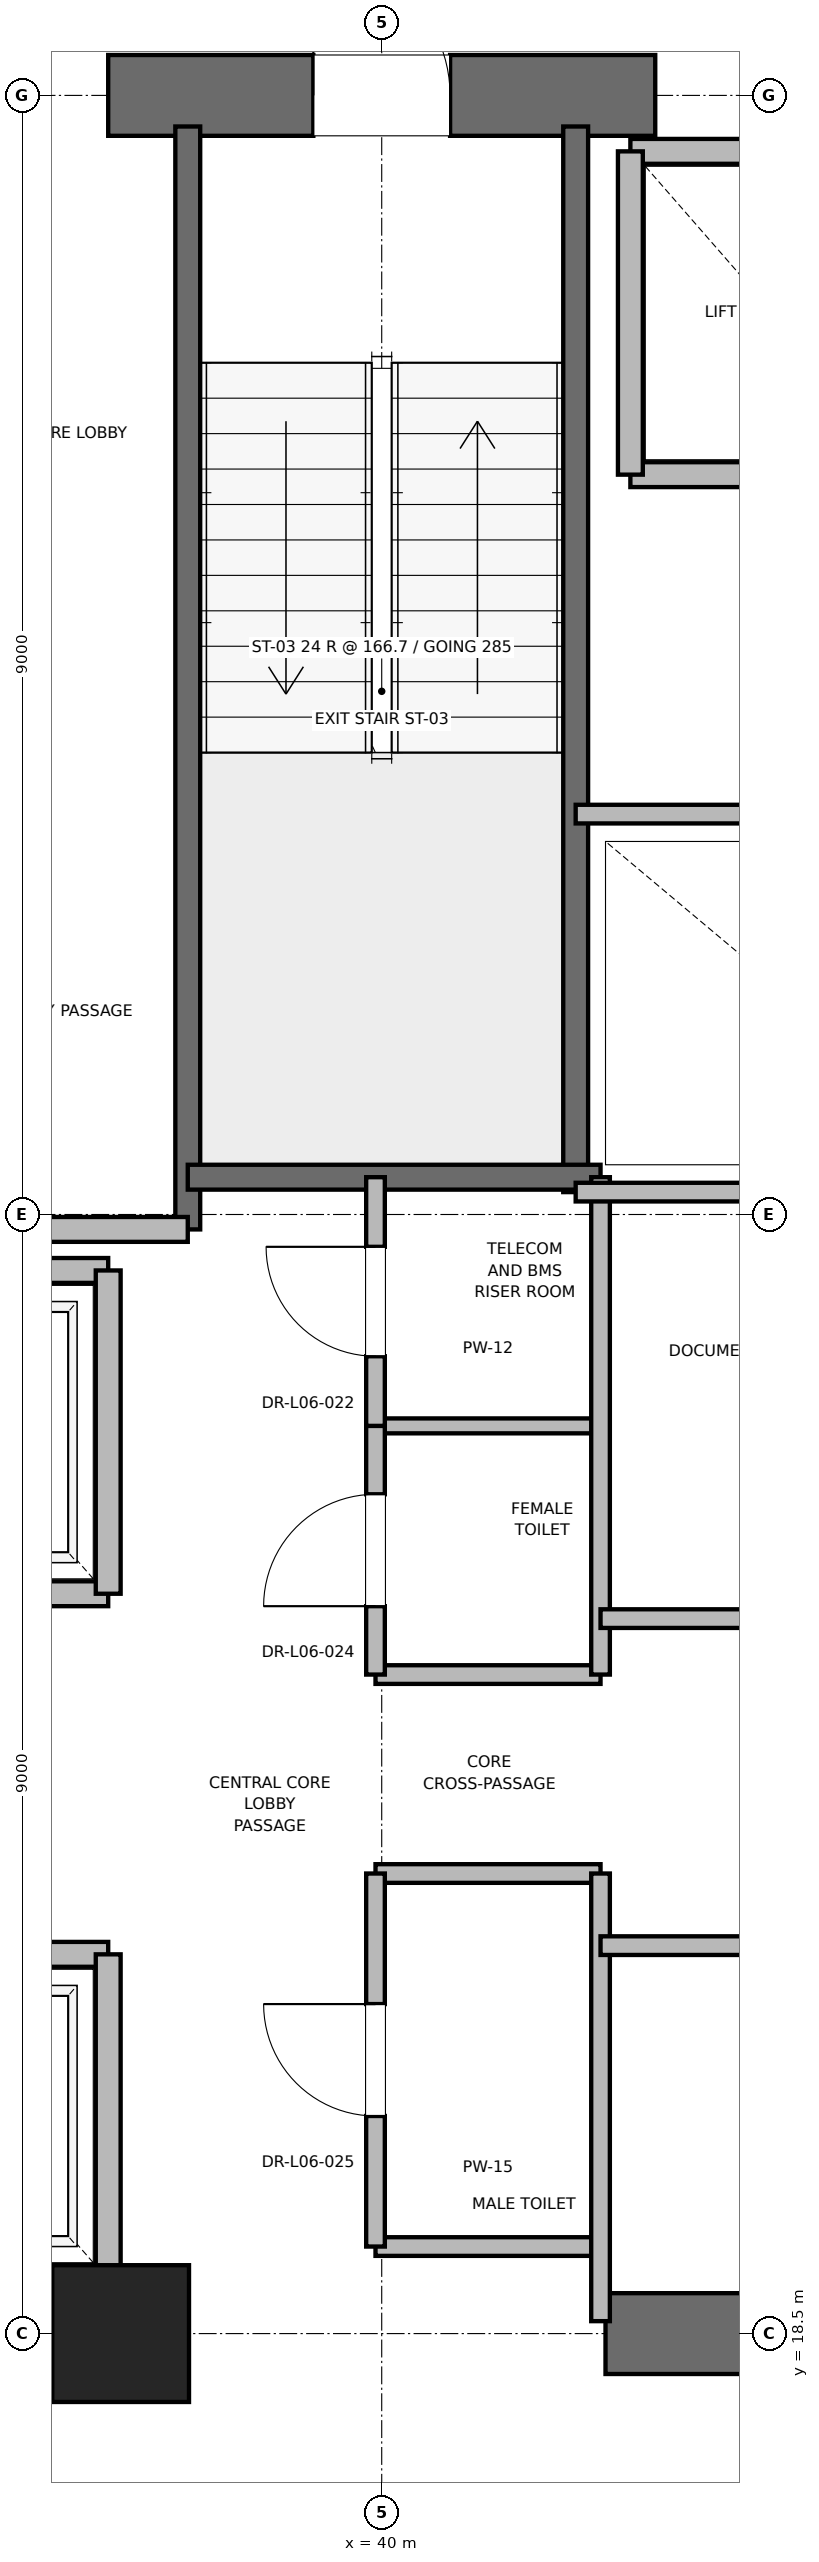
"""IFC4 building model, lengths in metres.
Left out: names, types, materials, properties, quantities, classifications, styles, units other than length and angle.
Written with IfcOpenShell. Run it as: python <this file> out.ifc"""

import sys

from ifc_helpers import new_model, si_unit, direction, frame, frame_2d, origin, origin_2d, place, context, subcontext, project, spatial, rectangle, extrude, element, fill, save


model = new_model("IFC4")
c1 = context("Model", 3, precision=1e-05, world=origin(), true_north=direction((0.0, 1.0)))
c2 = subcontext(c1, "Body", "Model", "MODEL_VIEW")
j1 = project(units=[si_unit("LENGTHUNIT", "METRE"), si_unit("PLANEANGLEUNIT", "RADIAN")], contexts=[c1])
p1 = place(None, origin())
s1 = spatial("IfcSite", under=j1, at=p1, CompositionType="ELEMENT")
p2 = place(p1, origin())
s2 = spatial("IfcBuilding", under=s1, at=p2, CompositionType="ELEMENT")
p3 = place(p2, frame((0.0, 0.0, 31.6)))
s3 = spatial("IfcBuildingStorey", under=s2, at=p3, CompositionType="ELEMENT", Elevation=31.6)
p4 = place(p3, frame((37.9, 18.5, 0.0), z_axis=(0.0, 0.0, 1.0), x_axis=(1.0, 0.0, 0.0)))
e1 = element("IfcColumn", 1, at=p4, inside=s3, PredefinedType="PILASTER", context=c2, shape_type="SweptSolid", body=[
    extrude(rectangle(XDim=1.1, YDim=1.1, at=origin_2d()), origin(), (0.0, 0.0, 1.0), 4.0),
])
for number, where, z_axis, x_axis in (
    (2, (29.0, 18.5, 0.0), (0.0, 0.0, 1.0), (1.0, 0.0, 0.0)),
    (3, (41.8, 18.5, 0.0), (0.0, 0.0, 1.0), (1.0, 0.0, 0.0)),
):
    element("IfcWall", number, at=place(p3, frame(where, z_axis=z_axis, x_axis=x_axis)), inside=s3, PredefinedType="SHEAR", context=c2, shape_type="SweptSolid", body=[
        extrude(rectangle(XDim=9.2, YDim=0.65, at=frame_2d((4.6, 0.0))), origin(), (0.0, 0.0, 1.0), 3.76),
    ])
p5 = place(p3, frame((37.8, 36.5, 0.0), z_axis=(0.0, 0.0, 1.0), x_axis=(1.0, 0.0, 0.0)))
e4 = element("IfcWall", 4, at=p5, inside=s3, PredefinedType="SHEAR", context=c2, shape_type="SweptSolid", body=[
    extrude(rectangle(XDim=4.4, YDim=0.65, at=frame_2d((2.2, 0.0))), origin(), (0.0, 0.0, 1.0), 3.76),
])
p6 = place(p5, frame((1.65, 0.0, 0.0)))
e5 = element("IfcOpeningElement", 5, at=p6, cuts=e4, PredefinedType="OPENING", context=c2, shape_type="SweptSolid", body=[
    extrude(rectangle(XDim=1.1, YDim=2.15, at=frame_2d((0.55, 1.075))), frame((0.0, 0.325, 0.0), z_axis=(0.0, -1.0, 0.0), x_axis=(1.0, 0.0, 0.0)), (0.0, 0.0, 1.0), 0.65),
])
p7 = place(p3, frame((38.44, 27.38, 0.0), z_axis=(0.0, 0.0, 1.0), x_axis=(0.0, 1.0, 0.0)))
e6 = element("IfcWall", 6, at=p7, inside=s3, PredefinedType="SOLIDWALL", context=c2, shape_type="SweptSolid", body=[
    extrude(rectangle(XDim=8.87, YDim=0.2, at=frame_2d((4.435, 0.0))), origin(), (0.0, 0.0, 1.0), 3.76),
])
p8 = place(p3, frame((41.56, 27.68, 0.0), z_axis=(0.0, 0.0, 1.0), x_axis=(0.0, 1.0, 0.0)))
e7 = element("IfcWall", 7, at=p8, inside=s3, PredefinedType="SOLIDWALL", context=c2, shape_type="SweptSolid", body=[
    extrude(rectangle(XDim=8.57, YDim=0.2, at=frame_2d((4.285, 0.0))), origin(), (0.0, 0.0, 1.0), 3.76),
])
p9 = place(p3, frame((38.44, 27.8, 0.0), z_axis=(0.0, 0.0, 1.0), x_axis=(1.0, 0.0, 0.0)))
e8 = element("IfcWall", 8, at=p9, inside=s3, PredefinedType="SOLIDWALL", context=c2, shape_type="SweptSolid", body=[
    extrude(rectangle(XDim=3.32, YDim=0.2, at=frame_2d((1.66, 0.0))), origin(), (0.0, 0.0, 1.0), 3.76),
])
p10 = place(p3, frame((32.82, 27.38, 0.0), z_axis=(0.0, 0.0, 1.0), x_axis=(1.0, 0.0, 0.0)))
e9 = element("IfcWall", 9, at=p10, inside=s3, PredefinedType="PARTITIONING", context=c2, shape_type="SweptSolid", body=[
    extrude(rectangle(XDim=5.62, YDim=0.2, at=frame_2d((2.81, 0.0))), origin(), (0.0, 0.0, 1.0), 3.76),
])
p11 = place(p3, frame((35.5, 18.95, 0.0), z_axis=(0.0, 0.0, 1.0), x_axis=(1.0, 0.0, 0.0)))
e10 = element("IfcWall", 10, at=p11, inside=s3, PredefinedType="SOLIDWALL", context=c2, shape_type="SweptSolid", body=[
    extrude(rectangle(XDim=2.3, YDim=0.2, at=frame_2d((1.15, 0.0))), origin(), (0.0, 0.0, 1.0), 2.54),
])
p12 = place(p3, frame((37.8, 21.55, 0.0), z_axis=(0.0, 0.0, 1.0), x_axis=(-1.0, 0.0, 0.0)))
e11 = element("IfcWall", 11, at=p12, inside=s3, PredefinedType="SOLIDWALL", context=c2, shape_type="SweptSolid", body=[
    extrude(rectangle(XDim=2.3, YDim=0.2, at=frame_2d((1.15, 0.0))), origin(), (0.0, 0.0, 1.0), 3.76),
])
p13 = place(p12, frame((0.6, 0.0, 0.0)))
e12 = element("IfcOpeningElement", 12, at=p13, cuts=e11, PredefinedType="OPENING", context=c2, shape_type="SweptSolid", body=[
    extrude(rectangle(XDim=1.1, YDim=2.2, at=frame_2d((0.55, 1.1))), frame((0.0, 0.1, 0.0), z_axis=(0.0, -1.0, 0.0), x_axis=(1.0, 0.0, 0.0)), (0.0, 0.0, 1.0), 0.2),
])
p14 = place(p3, frame((37.8, 18.95, 0.0), z_axis=(0.0, 0.0, 1.0), x_axis=(0.0, 1.0, 0.0)))
e13 = element("IfcWall", 13, at=p14, inside=s3, PredefinedType="SOLIDWALL", context=c2, shape_type="SweptSolid", body=[
    extrude(rectangle(XDim=2.6, YDim=0.2, at=frame_2d((1.3, 0.0))), origin(), (0.0, 0.0, 1.0), 2.54),
])
p15 = place(p3, frame((35.5, 24.45, 0.0), z_axis=(0.0, 0.0, 1.0), x_axis=(1.0, 0.0, 0.0)))
e14 = element("IfcWall", 14, at=p15, inside=s3, PredefinedType="SOLIDWALL", context=c2, shape_type="SweptSolid", body=[
    extrude(rectangle(XDim=2.3, YDim=0.2, at=frame_2d((1.15, 0.0))), origin(), (0.0, 0.0, 1.0), 3.76),
])
p16 = place(p15, frame((0.6, 0.0, 0.0)))
e15 = element("IfcOpeningElement", 15, at=p16, cuts=e14, PredefinedType="OPENING", context=c2, shape_type="SweptSolid", body=[
    extrude(rectangle(XDim=1.1, YDim=2.2, at=frame_2d((0.55, 1.1))), frame((0.0, 0.1, 0.0), z_axis=(0.0, -1.0, 0.0), x_axis=(1.0, 0.0, 0.0)), (0.0, 0.0, 1.0), 0.2),
])
p17 = place(p3, frame((37.8, 27.05, 0.0), z_axis=(0.0, 0.0, 1.0), x_axis=(-1.0, 0.0, 0.0)))
e16 = element("IfcWall", 16, at=p17, inside=s3, PredefinedType="SOLIDWALL", context=c2, shape_type="SweptSolid", body=[
    extrude(rectangle(XDim=2.3, YDim=0.2, at=frame_2d((1.15, 0.0))), origin(), (0.0, 0.0, 1.0), 3.76),
])
p18 = place(p3, frame((37.8, 24.45, 0.0), z_axis=(0.0, 0.0, 1.0), x_axis=(0.0, 1.0, 0.0)))
e17 = element("IfcWall", 17, at=p18, inside=s3, PredefinedType="SOLIDWALL", context=c2, shape_type="SweptSolid", body=[
    extrude(rectangle(XDim=2.6, YDim=0.2, at=frame_2d((1.3, 0.0))), origin(), (0.0, 0.0, 1.0), 3.76),
])
p19 = place(p3, frame((42.0, 33.45, 0.0), z_axis=(0.0, 0.0, 1.0), x_axis=(1.0, 0.0, 0.0)))
e18 = element("IfcWall", 18, at=p19, inside=s3, PredefinedType="SOLIDWALL", context=c2, shape_type="SweptSolid", body=[
    extrude(rectangle(XDim=2.3, YDim=0.2, at=frame_2d((1.15, 0.0))), origin(), (0.0, 0.0, 1.0), 3.76),
])
p20 = place(p3, frame((44.3, 36.05, 0.0), z_axis=(0.0, 0.0, 1.0), x_axis=(-1.0, 0.0, 0.0)))
e19 = element("IfcWall", 19, at=p20, inside=s3, PredefinedType="SOLIDWALL", context=c2, shape_type="SweptSolid", body=[
    extrude(rectangle(XDim=2.3, YDim=0.2, at=frame_2d((1.15, 0.0))), origin(), (0.0, 0.0, 1.0), 2.54),
])
p21 = place(p3, frame((42.0, 36.05, 0.0), z_axis=(0.0, 0.0, 1.0), x_axis=(0.0, -1.0, 0.0)))
e20 = element("IfcWall", 20, at=p21, inside=s3, PredefinedType="SOLIDWALL", context=c2, shape_type="SweptSolid", body=[
    extrude(rectangle(XDim=2.6, YDim=0.2, at=frame_2d((1.3, 0.0))), origin(), (0.0, 0.0, 1.0), 2.54),
])
for number, where, z_axis, x_axis in (
    (21, (39.95, 19.2, 0.0), (0.0, 0.0, 1.0), (1.0, 0.0, 0.0)),
    (22, (39.95, 22.2, 0.0), (0.0, 0.0, 1.0), (1.0, 0.0, 0.0)),
    (23, (39.95, 23.8, 0.0), (0.0, 0.0, 1.0), (1.0, 0.0, 0.0)),
):
    element("IfcWall", number, at=place(p3, frame(where, z_axis=z_axis, x_axis=x_axis)), inside=s3, PredefinedType="PARTITIONING", context=c2, shape_type="SweptSolid", body=[
        extrude(rectangle(XDim=1.81, YDim=0.15, at=frame_2d((0.905, 0.0))), origin(), (0.0, 0.0, 1.0), 2.85),
    ])
p22 = place(p3, frame((39.95, 25.8, 0.0), z_axis=(0.0, 0.0, 1.0), x_axis=(1.0, 0.0, 0.0)))
e24 = element("IfcWall", 24, at=p22, inside=s3, PredefinedType="PARTITIONING", context=c2, shape_type="SweptSolid", body=[
    extrude(rectangle(XDim=1.81, YDim=0.12, at=frame_2d((0.905, 0.0))), origin(), (0.0, 0.0, 1.0), 2.85),
])
p23 = place(p3, frame((41.76, 18.6, 0.0), z_axis=(0.0, 0.0, 1.0), x_axis=(0.0, 1.0, 0.0)))
e25 = element("IfcWall", 25, at=p23, inside=s3, PredefinedType="PARTITIONING", context=c2, shape_type="SweptSolid", body=[
    extrude(rectangle(XDim=3.6, YDim=0.15, at=frame_2d((1.8, 0.0))), origin(), (0.0, 0.0, 1.0), 2.54),
])
p24 = place(p3, frame((41.76, 23.8, 0.0), z_axis=(0.0, 0.0, 1.0), x_axis=(0.0, 1.0, 0.0)))
e26 = element("IfcWall", 26, at=p24, inside=s3, PredefinedType="PARTITIONING", context=c2, shape_type="SweptSolid", body=[
    extrude(rectangle(XDim=4.0, YDim=0.15, at=frame_2d((2.0, 0.0))), origin(), (0.0, 0.0, 1.0), 2.85),
])
p25 = place(p3, frame((39.95, 19.2, 0.0), z_axis=(0.0, 0.0, 1.0), x_axis=(0.0, 1.0, 0.0)))
e27 = element("IfcWall", 27, at=p25, inside=s3, PredefinedType="PARTITIONING", context=c2, shape_type="SweptSolid", body=[
    extrude(rectangle(XDim=3.0, YDim=0.15, at=frame_2d((1.5, 0.0))), origin(), (0.0, 0.0, 1.0), 2.85),
])
p26 = place(p25, frame((1.05, 0.0, 0.0)))
e28 = element("IfcOpeningElement", 28, at=p26, cuts=e27, PredefinedType="OPENING", context=c2, shape_type="SweptSolid", body=[
    extrude(rectangle(XDim=0.9, YDim=2.1, at=frame_2d((0.45, 1.05))), frame((0.0, 0.075, 0.0), z_axis=(0.0, -1.0, 0.0), x_axis=(1.0, 0.0, 0.0)), (0.0, 0.0, 1.0), 0.15),
])
p27 = place(p3, frame((39.95, 23.8, 0.0), z_axis=(0.0, 0.0, 1.0), x_axis=(0.0, 1.0, 0.0)))
e29 = element("IfcWall", 29, at=p27, inside=s3, PredefinedType="PARTITIONING", context=c2, shape_type="SweptSolid", body=[
    extrude(rectangle(XDim=2.0, YDim=0.15, at=frame_2d((1.0, 0.0))), origin(), (0.0, 0.0, 1.0), 2.85),
])
p28 = place(p27, frame((0.55, 0.0, 0.0)))
e30 = element("IfcOpeningElement", 30, at=p28, cuts=e29, PredefinedType="OPENING", context=c2, shape_type="SweptSolid", body=[
    extrude(rectangle(XDim=0.9, YDim=2.1, at=frame_2d((0.45, 1.05))), frame((0.0, 0.075, 0.0), z_axis=(0.0, -1.0, 0.0), x_axis=(1.0, 0.0, 0.0)), (0.0, 0.0, 1.0), 0.15),
])
p29 = place(p3, frame((39.95, 25.8, 0.0), z_axis=(0.0, 0.0, 1.0), x_axis=(0.0, 1.0, 0.0)))
e31 = element("IfcWall", 31, at=p29, inside=s3, PredefinedType="PARTITIONING", context=c2, shape_type="SweptSolid", body=[
    extrude(rectangle(XDim=2.0, YDim=0.15, at=frame_2d((1.0, 0.0))), origin(), (0.0, 0.0, 1.0), 2.85),
])
p30 = place(p29, frame((0.56, 0.0, 0.0)))
e32 = element("IfcOpeningElement", 32, at=p30, cuts=e31, PredefinedType="OPENING", context=c2, shape_type="SweptSolid", body=[
    extrude(rectangle(XDim=0.88, YDim=2.1, at=frame_2d((0.44, 1.05))), frame((0.0, 0.075, 0.0), z_axis=(0.0, -1.0, 0.0), x_axis=(1.0, 0.0, 0.0)), (0.0, 0.0, 1.0), 0.15),
])
p31 = place(p3, frame((41.56, 27.68, 0.0), z_axis=(0.0, 0.0, 1.0), x_axis=(1.0, 0.0, 0.0)))
e33 = element("IfcWall", 33, at=p31, inside=s3, PredefinedType="PARTITIONING", context=c2, shape_type="SweptSolid", body=[
    extrude(rectangle(XDim=3.59, YDim=0.15, at=frame_2d((1.795, 0.0))), origin(), (0.0, 0.0, 1.0), 2.85),
])
p32 = place(p3, frame((41.76, 21.62, 0.0), z_axis=(0.0, 0.0, 1.0), x_axis=(1.0, 0.0, 0.0)))
e34 = element("IfcWall", 34, at=p32, inside=s3, PredefinedType="PARTITIONING", context=c2, shape_type="SweptSolid", body=[
    extrude(rectangle(XDim=5.98, YDim=0.15, at=frame_2d((2.99, 0.0))), origin(), (0.0, 0.0, 1.0), 2.85),
])
p33 = place(p32, frame((2.49, 0.0, 0.0)))
e35 = element("IfcOpeningElement", 35, at=p33, cuts=e34, PredefinedType="OPENING", context=c2, shape_type="SweptSolid", body=[
    extrude(rectangle(XDim=1.0, YDim=2.15, at=frame_2d((0.5, 1.075))), frame((0.0, 0.075, 0.0), z_axis=(0.0, -1.0, 0.0), x_axis=(1.0, 0.0, 0.0)), (0.0, 0.0, 1.0), 0.15),
])
p34 = place(p3, frame((41.76, 24.25, 0.0), z_axis=(0.0, 0.0, 1.0), x_axis=(1.0, 0.0, 0.0)))
e36 = element("IfcWall", 36, at=p34, inside=s3, PredefinedType="PARTITIONING", context=c2, shape_type="SweptSolid", body=[
    extrude(rectangle(XDim=3.39, YDim=0.15, at=frame_2d((1.695, 0.0))), origin(), (0.0, 0.0, 1.0), 2.85),
])
p35 = place(p34, frame((1.195, 0.0, 0.0)))
e37 = element("IfcOpeningElement", 37, at=p35, cuts=e36, PredefinedType="OPENING", context=c2, shape_type="SweptSolid", body=[
    extrude(rectangle(XDim=1.0, YDim=2.15, at=frame_2d((0.5, 1.075))), frame((0.0, 0.075, 0.0), z_axis=(0.0, -1.0, 0.0), x_axis=(1.0, 0.0, 0.0)), (0.0, 0.0, 1.0), 0.15),
])
p36 = place(p3, frame((41.56, 30.72, 0.0), z_axis=(0.0, 0.0, 1.0), x_axis=(1.0, 0.0, 0.0)))
e38 = element("IfcWall", 38, at=p36, inside=s3, PredefinedType="PARTITIONING", context=c2, shape_type="SweptSolid", body=[
    extrude(rectangle(XDim=3.59, YDim=0.15, at=frame_2d((1.795, 0.0))), origin(), (0.0, 0.0, 1.0), 2.85),
])
p37 = place(p36, frame((1.355, 0.0, 0.0)))
e39 = element("IfcOpeningElement", 39, at=p37, cuts=e38, PredefinedType="OPENING", context=c2, shape_type="SweptSolid", body=[
    extrude(rectangle(XDim=0.88, YDim=2.1, at=frame_2d((0.44, 1.05))), frame((0.0, 0.075, 0.0), z_axis=(0.0, -1.0, 0.0), x_axis=(1.0, 0.0, 0.0)), (0.0, 0.0, 1.0), 0.15),
])
p38 = place(p6, origin())
e40 = element("IfcDoor", 40, at=p38, inside=s3, OperationType="SINGLE_SWING_LEFT", PredefinedType="DOOR", context=c2, shape_type="SweptSolid", body=[
    extrude(rectangle(XDim=1.1, YDim=2.15, at=frame_2d((0.55, 1.075))), frame((0.0, 0.025, 0.0), z_axis=(0.0, -1.0, 0.0), x_axis=(1.0, 0.0, 0.0)), (0.0, 0.0, 1.0), 0.05),
])
fill(e5, e40)
p39 = place(p26, origin())
e41 = element("IfcDoor", 41, at=p39, inside=s3, OperationType="SINGLE_SWING_RIGHT", PredefinedType="DOOR", context=c2, shape_type="SweptSolid", body=[
    extrude(rectangle(XDim=0.9, YDim=2.1, at=frame_2d((0.45, 1.05))), frame((0.0, 0.025, 0.0), z_axis=(0.0, -1.0, 0.0), x_axis=(1.0, 0.0, 0.0)), (0.0, 0.0, 1.0), 0.05),
])
fill(e28, e41)
p40 = place(p28, origin())
e42 = element("IfcDoor", 42, at=p40, inside=s3, OperationType="SINGLE_SWING_LEFT", PredefinedType="DOOR", context=c2, shape_type="SweptSolid", body=[
    extrude(rectangle(XDim=0.9, YDim=2.1, at=frame_2d((0.45, 1.05))), frame((0.0, 0.025, 0.0), z_axis=(0.0, -1.0, 0.0), x_axis=(1.0, 0.0, 0.0)), (0.0, 0.0, 1.0), 0.05),
])
fill(e30, e42)
p41 = place(p30, origin())
e43 = element("IfcDoor", 43, at=p41, inside=s3, OperationType="SINGLE_SWING_RIGHT", PredefinedType="DOOR", context=c2, shape_type="SweptSolid", body=[
    extrude(rectangle(XDim=0.88, YDim=2.1, at=frame_2d((0.44, 1.05))), frame((0.0, 0.025, 0.0), z_axis=(0.0, -1.0, 0.0), x_axis=(1.0, 0.0, 0.0)), (0.0, 0.0, 1.0), 0.05),
])
fill(e32, e43)
save(model, sys.argv[1])
